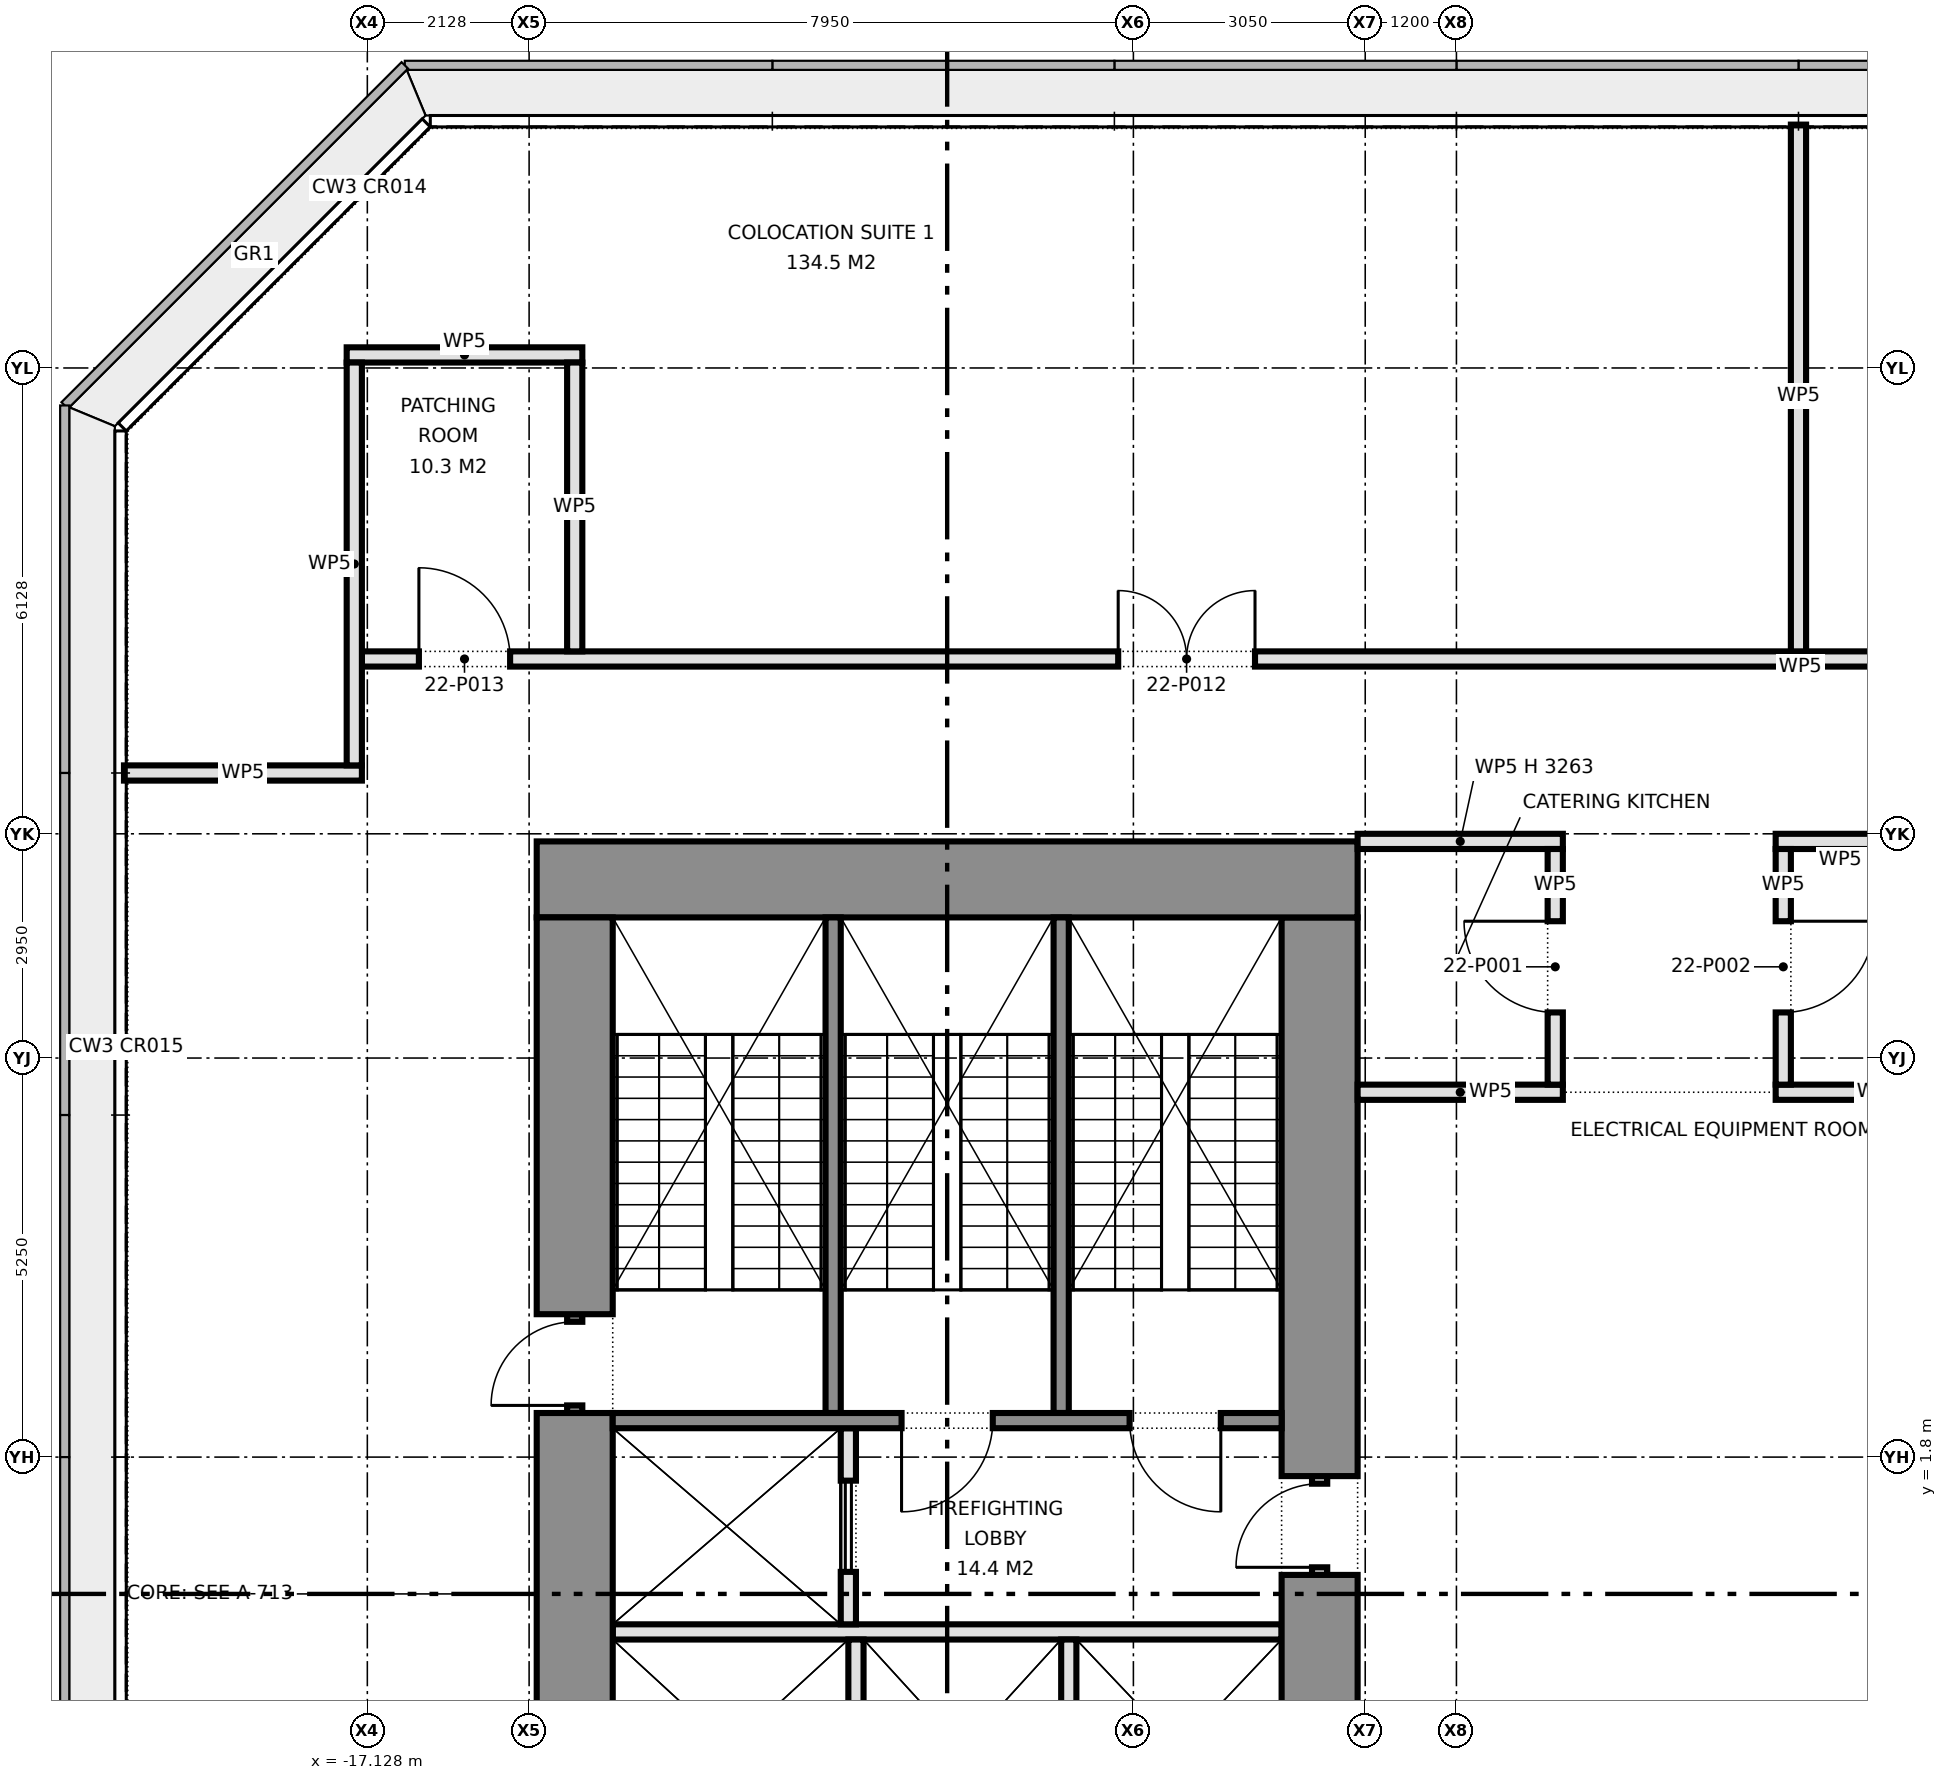
"""IFC4 building model, lengths in metres.
Left out: names, types, materials, properties, quantities, classifications, styles, units other than length and angle.
Written with IfcOpenShell. Run it as: python <this file> out.ifc"""

import sys

from ifc_helpers import new_model, si_unit, direction, frame, frame_2d, origin, place, context, subcontext, project, spatial, rectangle, extrude, element, fill, save


model = new_model("IFC4")
c1 = context("Model", 3, precision=1e-05, world=origin(), true_north=direction((0.0, 1.0)))
c2 = subcontext(c1, "Body", "Model", "MODEL_VIEW")
j1 = project(units=[si_unit("LENGTHUNIT", "METRE"), si_unit("PLANEANGLEUNIT", "RADIAN")], contexts=[c1])
p1 = place(None, origin())
s1 = spatial("IfcSite", under=j1, at=p1, CompositionType="ELEMENT")
p2 = place(p1, origin())
s2 = spatial("IfcBuilding", under=s1, at=p2, CompositionType="ELEMENT")
p3 = place(p2, frame((0.0, 0.0, 99.6)))
s3 = spatial("IfcBuildingStorey", under=s2, at=p3, CompositionType="ELEMENT", Elevation=99.6)
p4 = place(p3, frame((-14.9, 9.4, 0.0), z_axis=(0.0, 0.0, 1.0), x_axis=(1.0, 0.0, 0.0)))
e1 = element("IfcWall", 1, at=p4, inside=s3, PredefinedType="SHEAR", context=c2, shape_type="SweptSolid", body=[
    extrude(rectangle(XDim=10.8, YDim=1.0, at=frame_2d((5.4, 0.0))), origin(), (0.0, 0.0, 1.0), 4.2),
])
p5 = place(p3, frame((-14.4, -3.75, 0.0), z_axis=(0.0, 0.0, 1.0), x_axis=(0.0, 1.0, 0.0)))
e2 = element("IfcWall", 2, at=p5, inside=s3, PredefinedType="SHEAR", context=c2, shape_type="SweptSolid", body=[
    extrude(rectangle(XDim=6.13, YDim=1.0, at=frame_2d((3.065, 0.0))), origin(), (0.0, 0.0, 1.0), 4.2),
])
p6 = place(p3, frame((-14.4, 2.38, 0.0), z_axis=(0.0, 0.0, 1.0), x_axis=(0.0, 1.0, 0.0)))
e3 = element("IfcWall", 3, at=p6, inside=s3, PredefinedType="SHEAR", context=c2, shape_type="SweptSolid", body=[
    extrude(rectangle(XDim=1.3, YDim=0.2, at=frame_2d((0.65, 0.0))), origin(), (0.0, 0.0, 1.0), 2.4),
])
p7 = place(p6, frame((0.1, 0.0, 0.0)))
e4 = element("IfcOpeningElement", 4, at=p7, cuts=e3, PredefinedType="OPENING", context=c2, shape_type="SweptSolid", body=[
    extrude(rectangle(XDim=1.1, YDim=2.1, at=frame_2d((0.55, 1.05))), frame((0.0, 0.11, 0.0), z_axis=(0.0, -1.0, 0.0), x_axis=(1.0, 0.0, 0.0)), (0.0, 0.0, 1.0), 0.22),
])
p8 = place(p3, frame((-14.4, 3.68, 0.0), z_axis=(0.0, 0.0, 1.0), x_axis=(0.0, 1.0, 0.0)))
e5 = element("IfcWall", 5, at=p8, inside=s3, PredefinedType="SHEAR", context=c2, shape_type="SweptSolid", body=[
    extrude(rectangle(XDim=5.22, YDim=1.0, at=frame_2d((2.61, 0.0))), origin(), (0.0, 0.0, 1.0), 4.2),
])
p9 = place(p3, frame((-4.6, -3.75, 0.0), z_axis=(0.0, 0.0, 1.0), x_axis=(0.0, 1.0, 0.0)))
e6 = element("IfcWall", 6, at=p9, inside=s3, PredefinedType="SHEAR", context=c2, shape_type="SweptSolid", body=[
    extrude(rectangle(XDim=4.0, YDim=1.0, at=frame_2d((2.0, 0.0))), origin(), (0.0, 0.0, 1.0), 4.2),
])
p10 = place(p3, frame((-4.6, 0.25, 0.0), z_axis=(0.0, 0.0, 1.0), x_axis=(0.0, 1.0, 0.0)))
e7 = element("IfcWall", 7, at=p10, inside=s3, PredefinedType="PARTITIONING", context=c2, shape_type="SweptSolid", body=[
    extrude(rectangle(XDim=1.3, YDim=0.2, at=frame_2d((0.65, 0.0))), origin(), (0.0, 0.0, 1.0), 2.4),
])
p11 = place(p10, frame((0.1, 0.0, 0.0)))
e8 = element("IfcOpeningElement", 8, at=p11, cuts=e7, PredefinedType="OPENING", context=c2, shape_type="SweptSolid", body=[
    extrude(rectangle(XDim=1.1, YDim=2.1, at=frame_2d((0.55, 1.05))), frame((0.0, 0.11, 0.0), z_axis=(0.0, -1.0, 0.0), x_axis=(1.0, 0.0, 0.0)), (0.0, 0.0, 1.0), 0.22),
])
p12 = place(p3, frame((-4.6, 1.55, 0.0), z_axis=(0.0, 0.0, 1.0), x_axis=(0.0, 1.0, 0.0)))
e9 = element("IfcWall", 9, at=p12, inside=s3, PredefinedType="SHEAR", context=c2, shape_type="SweptSolid", body=[
    extrude(rectangle(XDim=7.35, YDim=1.0, at=frame_2d((3.675, 0.0))), origin(), (0.0, 0.0, 1.0), 4.2),
])
p13 = place(p3, frame((-13.9, -0.5, 0.0), z_axis=(0.0, 0.0, 1.0), x_axis=(1.0, 0.0, 0.0)))
e10 = element("IfcWall", 10, at=p13, inside=s3, PredefinedType="PARTITIONING", context=c2, shape_type="SweptSolid", body=[
    extrude(rectangle(XDim=8.8, YDim=0.2, at=frame_2d((4.4, 0.0))), origin(), (0.0, 0.0, 1.0), 4.2),
])
p14 = place(p3, frame((-10.8, -0.4, 0.0), z_axis=(0.0, 0.0, 1.0), x_axis=(0.0, 1.0, 0.0)))
e11 = element("IfcWall", 11, at=p14, inside=s3, PredefinedType="PARTITIONING", context=c2, shape_type="SweptSolid", body=[
    extrude(rectangle(XDim=2.58, YDim=0.2, at=frame_2d((1.29, 0.0))), origin(), (0.0, 0.0, 1.0), 4.2),
])
p15 = place(p14, frame((0.69, 0.0, 0.0)))
e12 = element("IfcOpeningElement", 12, at=p15, cuts=e11, PredefinedType="OPENING", context=c2, shape_type="SweptSolid", body=[
    extrude(rectangle(XDim=1.2, YDim=2.1, at=frame_2d((0.6, 1.05))), frame((0.0, 0.11, 0.0), z_axis=(0.0, -1.0, 0.0), x_axis=(1.0, 0.0, 0.0)), (0.0, 0.0, 1.0), 0.22),
])
p16 = place(p3, frame((-13.9, 2.28, 0.0), z_axis=(0.0, 0.0, 1.0), x_axis=(1.0, 0.0, 0.0)))
e13 = element("IfcWall", 13, at=p16, inside=s3, PredefinedType="SHEAR", context=c2, shape_type="SweptSolid", body=[
    extrude(rectangle(XDim=8.8, YDim=0.2, at=frame_2d((4.4, 0.0))), origin(), (0.0, 0.0, 1.0), 4.2),
])
p17 = place(p16, frame((3.8, 0.0, 0.0)))
e14 = element("IfcOpeningElement", 14, at=p17, cuts=e13, PredefinedType="OPENING", context=c2, shape_type="SweptSolid", body=[
    extrude(rectangle(XDim=1.2, YDim=2.1, at=frame_2d((0.6, 1.05))), frame((0.0, 0.11, 0.0), z_axis=(0.0, -1.0, 0.0), x_axis=(1.0, 0.0, 0.0)), (0.0, 0.0, 1.0), 0.22),
])
p18 = place(p16, frame((6.8, 0.0, 0.0)))
e15 = element("IfcOpeningElement", 15, at=p18, cuts=e13, PredefinedType="OPENING", context=c2, shape_type="SweptSolid", body=[
    extrude(rectangle(XDim=1.2, YDim=2.1, at=frame_2d((0.6, 1.05))), frame((0.0, 0.11, 0.0), z_axis=(0.0, -1.0, 0.0), x_axis=(1.0, 0.0, 0.0)), (0.0, 0.0, 1.0), 0.22),
])
for number, where, z_axis, x_axis in (
    (16, (-11.0, 2.38, 0.0), (0.0, 0.0, 1.0), (0.0, 1.0, 0.0)),
    (17, (-8.0, 2.38, 0.0), (0.0, 0.0, 1.0), (0.0, 1.0, 0.0)),
):
    element("IfcWall", number, at=place(p3, frame(where, z_axis=z_axis, x_axis=x_axis)), inside=s3, PredefinedType="SHEAR", context=c2, shape_type="SweptSolid", body=[
        extrude(rectangle(XDim=6.52, YDim=0.2, at=frame_2d((3.26, 0.0))), origin(), (0.0, 0.0, 1.0), 4.2),
    ])
for number, where, z_axis, x_axis in (
    (18, (-10.7, -3.45, 0.0), (0.0, 0.0, 1.0), (0.0, 1.0, 0.0)),
    (19, (-7.9, -3.45, 0.0), (0.0, 0.0, 1.0), (0.0, 1.0, 0.0)),
):
    element("IfcWall", number, at=place(p3, frame(where, z_axis=z_axis, x_axis=x_axis)), inside=s3, PredefinedType="PARTITIONING", context=c2, shape_type="SweptSolid", body=[
        extrude(rectangle(XDim=2.85, YDim=0.2, at=frame_2d((1.425, 0.0))), origin(), (0.0, 0.0, 1.0), 4.2),
    ])
for number, where, z_axis, x_axis in (
    (20, (-4.1, 6.6, 0.0), (0.0, 0.0, 1.0), (1.0, 0.0, 0.0)),
    (21, (1.4, 6.6, 0.0), (0.0, 0.0, 1.0), (1.0, 0.0, 0.0)),
):
    element("IfcWall", number, at=place(p3, frame(where, z_axis=z_axis, x_axis=x_axis)), inside=s3, PredefinedType="PARTITIONING", context=c2, shape_type="SweptSolid", body=[
        extrude(rectangle(XDim=2.7, YDim=0.2, at=frame_2d((1.35, 0.0))), origin(), (0.0, 0.0, 1.0), 4.2),
    ])
for number, where, z_axis, x_axis in (
    (22, (-4.1, 9.9, 0.0), (0.0, 0.0, 1.0), (1.0, 0.0, 0.0)),
    (23, (1.4, 9.9, 0.0), (0.0, 0.0, 1.0), (1.0, 0.0, 0.0)),
):
    element("IfcWall", number, at=place(p3, frame(where, z_axis=z_axis, x_axis=x_axis)), inside=s3, PredefinedType="PARTITIONING", context=c2, shape_type="SweptSolid", body=[
        extrude(rectangle(XDim=2.7, YDim=0.2, at=frame_2d((1.35, 0.0))), origin(), (0.0, 0.0, 1.0), 3.263),
    ])
p19 = place(p3, frame((-20.33, 10.8, 0.0), z_axis=(0.0, 0.0, 1.0), x_axis=(1.0, 0.0, 0.0)))
e24 = element("IfcWall", 24, at=p19, inside=s3, PredefinedType="PARTITIONING", context=c2, shape_type="SweptSolid", body=[
    extrude(rectangle(XDim=3.13, YDim=0.2, at=frame_2d((1.565, 0.0))), origin(), (0.0, 0.0, 1.0), 4.2),
])
p20 = place(p3, frame((-17.2, 12.3, 0.0), z_axis=(0.0, 0.0, 1.0), x_axis=(1.0, 0.0, 0.0)))
e25 = element("IfcWall", 25, at=p20, inside=s3, PredefinedType="PARTITIONING", context=c2, shape_type="SweptSolid", body=[
    extrude(rectangle(XDim=34.6, YDim=0.2, at=frame_2d((17.3, 0.0))), origin(), (0.0, 0.0, 1.0), 4.2),
])
p21 = place(p20, frame((9.95, 0.0, 0.0)))
e26 = element("IfcOpeningElement", 26, at=p21, cuts=e25, PredefinedType="OPENING", context=c2, shape_type="SweptSolid", body=[
    extrude(rectangle(XDim=1.8, YDim=2.1, at=frame_2d((0.9, 1.05))), frame((0.0, 0.11, 0.0), z_axis=(0.0, -1.0, 0.0), x_axis=(1.0, 0.0, 0.0)), (0.0, 0.0, 1.0), 0.22),
])
p22 = place(p20, frame((0.75, 0.0, 0.0)))
e27 = element("IfcOpeningElement", 27, at=p22, cuts=e25, PredefinedType="OPENING", context=c2, shape_type="SweptSolid", body=[
    extrude(rectangle(XDim=1.2, YDim=2.1, at=frame_2d((0.6, 1.05))), frame((0.0, 0.11, 0.0), z_axis=(0.0, -1.0, 0.0), x_axis=(1.0, 0.0, 0.0)), (0.0, 0.0, 1.0), 0.22),
])
p23 = place(p20, frame((26.1, 0.0, 0.0)))
e28 = element("IfcOpeningElement", 28, at=p23, cuts=e25, PredefinedType="OPENING", context=c2, shape_type="SweptSolid", body=[
    extrude(rectangle(XDim=1.2, YDim=2.1, at=frame_2d((0.6, 1.05))), frame((0.0, 0.11, 0.0), z_axis=(0.0, -1.0, 0.0), x_axis=(1.0, 0.0, 0.0)), (0.0, 0.0, 1.0), 0.22),
])
p24 = place(p3, frame((-17.4, 16.3, 0.0), z_axis=(0.0, 0.0, 1.0), x_axis=(1.0, 0.0, 0.0)))
e29 = element("IfcWall", 29, at=p24, inside=s3, PredefinedType="PARTITIONING", context=c2, shape_type="SweptSolid", body=[
    extrude(rectangle(XDim=3.1, YDim=0.2, at=frame_2d((1.55, 0.0))), origin(), (0.0, 0.0, 1.0), 4.2),
])
p25 = place(p3, frame((1.7, 12.4, 0.0), z_axis=(0.0, 0.0, 1.0), x_axis=(0.0, 1.0, 0.0)))
e30 = element("IfcWall", 30, at=p25, inside=s3, PredefinedType="PARTITIONING", context=c2, shape_type="SweptSolid", body=[
    extrude(rectangle(XDim=6.93, YDim=0.2, at=frame_2d((3.465, 0.0))), origin(), (0.0, 0.0, 1.0), 4.2),
])
p26 = place(p3, frame((1.5, 6.7, 0.0), z_axis=(0.0, 0.0, 1.0), x_axis=(0.0, 1.0, 0.0)))
e31 = element("IfcWall", 31, at=p26, inside=s3, PredefinedType="PARTITIONING", context=c2, shape_type="SweptSolid", body=[
    extrude(rectangle(XDim=3.1, YDim=0.2, at=frame_2d((1.55, 0.0))), origin(), (0.0, 0.0, 1.0), 4.2),
])
p27 = place(p26, frame((0.95, 0.0, 0.0)))
e32 = element("IfcOpeningElement", 32, at=p27, cuts=e31, PredefinedType="OPENING", context=c2, shape_type="SweptSolid", body=[
    extrude(rectangle(XDim=1.2, YDim=2.1, at=frame_2d((0.6, 1.05))), frame((0.0, 0.11, 0.0), z_axis=(0.0, -1.0, 0.0), x_axis=(1.0, 0.0, 0.0)), (0.0, 0.0, 1.0), 0.22),
])
p28 = place(p3, frame((-1.5, 6.7, 0.0), z_axis=(0.0, 0.0, 1.0), x_axis=(0.0, 1.0, 0.0)))
e33 = element("IfcWall", 33, at=p28, inside=s3, PredefinedType="PARTITIONING", context=c2, shape_type="SweptSolid", body=[
    extrude(rectangle(XDim=3.1, YDim=0.2, at=frame_2d((1.55, 0.0))), origin(), (0.0, 0.0, 1.0), 4.2),
])
p29 = place(p28, frame((0.95, 0.0, 0.0)))
e34 = element("IfcOpeningElement", 34, at=p29, cuts=e33, PredefinedType="OPENING", context=c2, shape_type="SweptSolid", body=[
    extrude(rectangle(XDim=1.2, YDim=2.1, at=frame_2d((0.6, 1.05))), frame((0.0, 0.11, 0.0), z_axis=(0.0, -1.0, 0.0), x_axis=(1.0, 0.0, 0.0)), (0.0, 0.0, 1.0), 0.22),
])
p30 = place(p3, frame((-14.4, 12.4, 0.0), z_axis=(0.0, 0.0, 1.0), x_axis=(0.0, 1.0, 0.0)))
e35 = element("IfcWall", 35, at=p30, inside=s3, PredefinedType="PARTITIONING", context=c2, shape_type="SweptSolid", body=[
    extrude(rectangle(XDim=3.8, YDim=0.2, at=frame_2d((1.9, 0.0))), origin(), (0.0, 0.0, 1.0), 4.2),
])
p31 = place(p3, frame((-17.3, 10.9, 0.0), z_axis=(0.0, 0.0, 1.0), x_axis=(0.0, 1.0, 0.0)))
e36 = element("IfcWall", 36, at=p31, inside=s3, PredefinedType="PARTITIONING", context=c2, shape_type="SweptSolid", body=[
    extrude(rectangle(XDim=5.3, YDim=0.2, at=frame_2d((2.65, 0.0))), origin(), (0.0, 0.0, 1.0), 4.2),
])
p32 = place(p7, origin())
e37 = element("IfcDoor", 37, at=p32, inside=s3, OperationType="SINGLE_SWING_LEFT", PredefinedType="DOOR", context=c2, shape_type="SweptSolid", body=[
    extrude(rectangle(XDim=1.1, YDim=2.1, at=frame_2d((0.55, 1.05))), frame((0.0, 0.025, 0.0), z_axis=(0.0, -1.0, 0.0), x_axis=(1.0, 0.0, 0.0)), (0.0, 0.0, 1.0), 0.05),
])
fill(e4, e37)
p33 = place(p11, origin())
e38 = element("IfcDoor", 38, at=p33, inside=s3, OperationType="SINGLE_SWING_LEFT", PredefinedType="DOOR", context=c2, shape_type="SweptSolid", body=[
    extrude(rectangle(XDim=1.1, YDim=2.1, at=frame_2d((0.55, 1.05))), frame((0.0, 0.025, 0.0), z_axis=(0.0, -1.0, 0.0), x_axis=(1.0, 0.0, 0.0)), (0.0, 0.0, 1.0), 0.05),
])
fill(e8, e38)
p34 = place(p15, origin())
e39 = element("IfcDoor", 39, at=p34, inside=s3, OperationType="DOUBLE_DOOR_SLIDING", PredefinedType="DOOR", context=c2, shape_type="SweptSolid", body=[
    extrude(rectangle(XDim=1.2, YDim=2.1, at=frame_2d((0.6, 1.05))), frame((0.0, 0.025, 0.0), z_axis=(0.0, -1.0, 0.0), x_axis=(1.0, 0.0, 0.0)), (0.0, 0.0, 1.0), 0.05),
])
fill(e12, e39)
p35 = place(p17, frame((1.2, 0.0, 0.0), z_axis=(0.0, 0.0, 1.0), x_axis=(-1.0, 0.0, 0.0)))
e40 = element("IfcDoor", 40, at=p35, inside=s3, OperationType="SINGLE_SWING_RIGHT", PredefinedType="DOOR", context=c2, shape_type="SweptSolid", body=[
    extrude(rectangle(XDim=1.2, YDim=2.1, at=frame_2d((0.6, 1.05))), frame((0.0, 0.025, 0.0), z_axis=(0.0, -1.0, 0.0), x_axis=(1.0, 0.0, 0.0)), (0.0, 0.0, 1.0), 0.05),
])
fill(e14, e40)
p36 = place(p18, frame((1.2, 0.0, 0.0), z_axis=(0.0, 0.0, 1.0), x_axis=(-1.0, 0.0, 0.0)))
e41 = element("IfcDoor", 41, at=p36, inside=s3, OperationType="SINGLE_SWING_LEFT", PredefinedType="DOOR", context=c2, shape_type="SweptSolid", body=[
    extrude(rectangle(XDim=1.2, YDim=2.1, at=frame_2d((0.6, 1.05))), frame((0.0, 0.025, 0.0), z_axis=(0.0, -1.0, 0.0), x_axis=(1.0, 0.0, 0.0)), (0.0, 0.0, 1.0), 0.05),
])
fill(e15, e41)
p37 = place(p29, origin())
e42 = element("IfcDoor", 42, at=p37, inside=s3, OperationType="SINGLE_SWING_RIGHT", PredefinedType="DOOR", context=c2, shape_type="SweptSolid", body=[
    extrude(rectangle(XDim=1.2, YDim=2.1, at=frame_2d((0.6, 1.05))), frame((0.0, 0.025, 0.0), z_axis=(0.0, -1.0, 0.0), x_axis=(1.0, 0.0, 0.0)), (0.0, 0.0, 1.0), 0.05),
])
fill(e34, e42)
p38 = place(p27, frame((1.2, 0.0, 0.0), z_axis=(0.0, 0.0, 1.0), x_axis=(-1.0, 0.0, 0.0)))
e43 = element("IfcDoor", 43, at=p38, inside=s3, OperationType="SINGLE_SWING_LEFT", PredefinedType="DOOR", context=c2, shape_type="SweptSolid", body=[
    extrude(rectangle(XDim=1.2, YDim=2.1, at=frame_2d((0.6, 1.05))), frame((0.0, 0.025, 0.0), z_axis=(0.0, -1.0, 0.0), x_axis=(1.0, 0.0, 0.0)), (0.0, 0.0, 1.0), 0.05),
])
fill(e32, e43)
p39 = place(p21, origin())
e44 = element("IfcDoor", 44, at=p39, inside=s3, OperationType="DOUBLE_DOOR_SINGLE_SWING", PredefinedType="DOOR", context=c2, shape_type="SweptSolid", body=[
    extrude(rectangle(XDim=1.8, YDim=2.1, at=frame_2d((0.9, 1.05))), frame((0.0, 0.025, 0.0), z_axis=(0.0, -1.0, 0.0), x_axis=(1.0, 0.0, 0.0)), (0.0, 0.0, 1.0), 0.05),
])
fill(e26, e44)
p40 = place(p22, origin())
e45 = element("IfcDoor", 45, at=p40, inside=s3, OperationType="SINGLE_SWING_LEFT", PredefinedType="DOOR", context=c2, shape_type="SweptSolid", body=[
    extrude(rectangle(XDim=1.2, YDim=2.1, at=frame_2d((0.6, 1.05))), frame((0.0, 0.025, 0.0), z_axis=(0.0, -1.0, 0.0), x_axis=(1.0, 0.0, 0.0)), (0.0, 0.0, 1.0), 0.05),
])
fill(e27, e45)
save(model, sys.argv[1])
